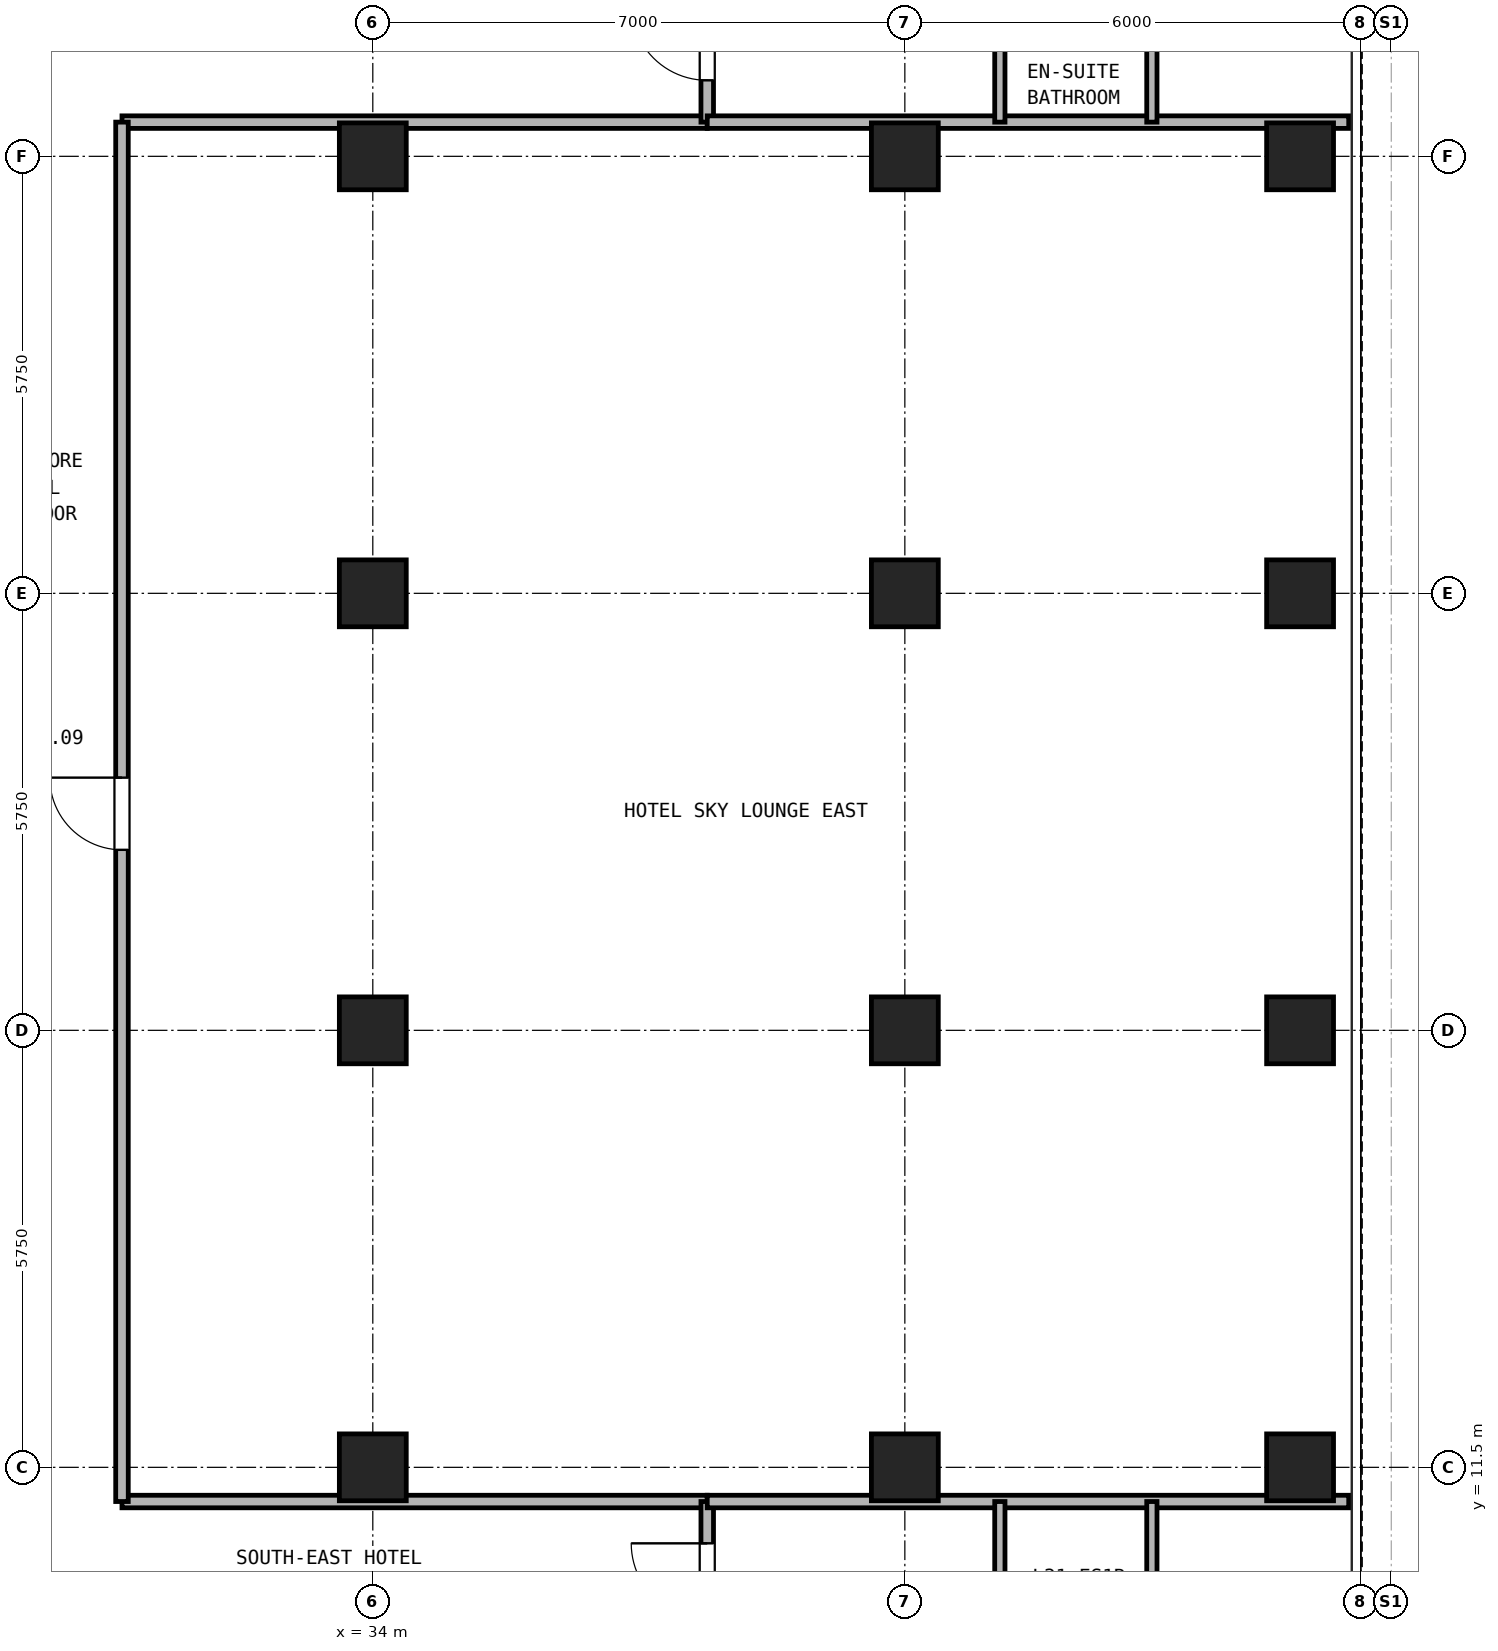
"""IFC4 building model, lengths in metres.
Left out: names, types, materials, properties, quantities, classifications, styles, units other than length and angle.
Written with IfcOpenShell. Run it as: python <this file> out.ifc"""

import sys

from ifc_helpers import new_model, si_unit, direction, frame, frame_2d, origin, origin_2d, place, context, subcontext, project, spatial, rectangle, hollow_rectangle, extrude, source, transform, mapped, element, fill, save


model = new_model("IFC4")
c1 = context("Model", 3, precision=1e-05, world=origin(), true_north=direction((0.0, 1.0)))
c2 = subcontext(c1, "Body", "Model", "MODEL_VIEW")
j1 = project(units=[si_unit("LENGTHUNIT", "METRE"), si_unit("PLANEANGLEUNIT", "RADIAN")], contexts=[c1])
p1 = place(None, origin())
s1 = spatial("IfcSite", under=j1, at=p1, CompositionType="ELEMENT")
p2 = place(p1, origin())
s2 = spatial("IfcBuilding", under=s1, at=p2, CompositionType="ELEMENT")
p3 = place(p2, frame((0.0, 0.0, 115.1)))
s3 = spatial("IfcBuildingStorey", under=s2, at=p3, CompositionType="ELEMENT", Elevation=115.1)
m1 = source(origin(), c2, "Body", "SweptSolid", [
    extrude(hollow_rectangle(XDim=0.88, YDim=0.88, WallThickness=0.05, at=origin_2d()), origin(), (0.0, 0.0, 1.0), 2.95),
])
for number, where, z_axis, x_axis in (
    (1, (46.2, 11.5, 0.0), (0.0, 0.0, 1.0), (1.0, 0.0, 0.0)),
    (2, (46.2, 17.25, 0.0), (0.0, 0.0, 1.0), (1.0, 0.0, 0.0)),
    (3, (46.2, 23.0, 0.0), (0.0, 0.0, 1.0), (1.0, 0.0, 0.0)),
    (4, (46.2, 28.75, 0.0), (0.0, 0.0, 1.0), (1.0, 0.0, 0.0)),
    (5, (34.0, 11.5, 0.0), (0.0, 0.0, 1.0), (1.0, 0.0, 0.0)),
    (6, (34.0, 17.25, 0.0), (0.0, 0.0, 1.0), (1.0, 0.0, 0.0)),
    (7, (34.0, 23.0, 0.0), (0.0, 0.0, 1.0), (1.0, 0.0, 0.0)),
    (8, (34.0, 28.75, 0.0), (0.0, 0.0, 1.0), (1.0, 0.0, 0.0)),
    (9, (41.0, 11.5, 0.0), (0.0, 0.0, 1.0), (1.0, 0.0, 0.0)),
    (10, (41.0, 17.25, 0.0), (0.0, 0.0, 1.0), (1.0, 0.0, 0.0)),
    (11, (41.0, 23.0, 0.0), (0.0, 0.0, 1.0), (1.0, 0.0, 0.0)),
    (12, (41.0, 28.75, 0.0), (0.0, 0.0, 1.0), (1.0, 0.0, 0.0)),
):
    element("IfcColumn", number, at=place(p3, frame(where, z_axis=z_axis, x_axis=x_axis)), inside=s3, PredefinedType="COLUMN", context=c2, shape_type="MappedRepresentation", body=[
        mapped(m1, transform((0.0, 0.0, 0.0), x_axis=(1.0, 0.0, 0.0), y_axis=(0.0, 1.0, 0.0), z_axis=(0.0, 0.0, 1.0), scale=1.0)),
    ])
for number, where, z_axis, x_axis in (
    (13, (30.7, 11.05, 0.0), (0.0, 0.0, 1.0), (1.0, 0.0, 0.0)),
    (14, (30.7, 29.2, 0.0), (0.0, 0.0, 1.0), (1.0, 0.0, 0.0)),
):
    element("IfcWall", number, at=place(p3, frame(where, z_axis=z_axis, x_axis=x_axis)), inside=s3, PredefinedType="PARTITIONING", context=c2, shape_type="SweptSolid", body=[
        extrude(rectangle(XDim=7.7, YDim=0.165, at=frame_2d((3.85, 0.0))), origin(), (0.0, 0.0, 1.0), 2.95),
    ])
p4 = place(p3, frame((30.7, 11.05, 0.0), z_axis=(0.0, 0.0, 1.0), x_axis=(0.0, 1.0, 0.0)))
e15 = element("IfcWall", 15, at=p4, inside=s3, PredefinedType="PARTITIONING", context=c2, shape_type="SweptSolid", body=[
    extrude(rectangle(XDim=18.15, YDim=0.165, at=frame_2d((9.075, 0.0))), origin(), (0.0, 0.0, 1.0), 2.95),
])
p5 = place(p4, frame((8.575, 0.0, 0.0)))
e16 = element("IfcOpeningElement", 16, at=p5, cuts=e15, PredefinedType="OPENING", context=c2, shape_type="SweptSolid", body=[
    extrude(rectangle(XDim=0.95, YDim=2.15, at=frame_2d((0.475, 1.075))), frame((0.0, 0.093, 0.0), z_axis=(0.0, -1.0, 0.0), x_axis=(1.0, 0.0, 0.0)), (0.0, 0.0, 1.0), 0.185),
])
p6 = place(p3, frame((38.4, 0.16, 0.0), z_axis=(0.0, 0.0, 1.0), x_axis=(0.0, 1.0, 0.0)))
e17 = element("IfcWall", 17, at=p6, inside=s3, PredefinedType="PARTITIONING", context=c2, shape_type="SweptSolid", body=[
    extrude(rectangle(XDim=10.89, YDim=0.165, at=frame_2d((5.445, 0.0))), origin(), (0.0, 0.0, 1.0), 2.95),
])
p7 = place(p6, frame((9.34, 0.0, 0.0)))
e18 = element("IfcOpeningElement", 18, at=p7, cuts=e17, PredefinedType="OPENING", context=c2, shape_type="SweptSolid", body=[
    extrude(rectangle(XDim=1.0, YDim=2.15, at=frame_2d((0.5, 1.075))), frame((0.0, 0.093, 0.0), z_axis=(0.0, -1.0, 0.0), x_axis=(1.0, 0.0, 0.0)), (0.0, 0.0, 1.0), 0.185),
])
p8 = place(p3, frame((38.4, 29.2, 0.0), z_axis=(0.0, 0.0, 1.0), x_axis=(0.0, 1.0, 0.0)))
e19 = element("IfcWall", 19, at=p8, inside=s3, PredefinedType="PARTITIONING", context=c2, shape_type="SweptSolid", body=[
    extrude(rectangle(XDim=5.94, YDim=0.165, at=frame_2d((2.97, 0.0))), origin(), (0.0, 0.0, 1.0), 2.95),
])
p9 = place(p8, frame((0.55, 0.0, 0.0)))
e20 = element("IfcOpeningElement", 20, at=p9, cuts=e19, PredefinedType="OPENING", context=c2, shape_type="SweptSolid", body=[
    extrude(rectangle(XDim=1.0, YDim=2.15, at=frame_2d((0.5, 1.075))), frame((0.0, 0.093, 0.0), z_axis=(0.0, -1.0, 0.0), x_axis=(1.0, 0.0, 0.0)), (0.0, 0.0, 1.0), 0.185),
])
for number, where, z_axis, x_axis in (
    (21, (38.4, 11.05, 0.0), (0.0, 0.0, 1.0), (1.0, 0.0, 0.0)),
    (22, (38.4, 29.2, 0.0), (0.0, 0.0, 1.0), (1.0, 0.0, 0.0)),
):
    element("IfcWall", number, at=place(p3, frame(where, z_axis=z_axis, x_axis=x_axis)), inside=s3, PredefinedType="PARTITIONING", context=c2, shape_type="SweptSolid", body=[
        extrude(rectangle(XDim=8.44, YDim=0.165, at=frame_2d((4.22, 0.0))), origin(), (0.0, 0.0, 1.0), 2.95),
    ])
for number, where, z_axis, x_axis in (
    (23, (42.25, 8.95, 0.0), (0.0, 0.0, 1.0), (0.0, 1.0, 0.0)),
    (24, (44.25, 8.95, 0.0), (0.0, 0.0, 1.0), (0.0, 1.0, 0.0)),
    (25, (42.25, 29.2, 0.0), (0.0, 0.0, 1.0), (0.0, 1.0, 0.0)),
    (26, (44.25, 29.2, 0.0), (0.0, 0.0, 1.0), (0.0, 1.0, 0.0)),
):
    element("IfcWall", number, at=place(p3, frame(where, z_axis=z_axis, x_axis=x_axis)), inside=s3, PredefinedType="PARTITIONING", context=c2, shape_type="SweptSolid", body=[
        extrude(rectangle(XDim=2.1, YDim=0.135, at=frame_2d((1.05, 0.0))), origin(), (0.0, 0.0, 1.0), 2.95),
    ])
p10 = place(p7, frame((1.0, 0.0, 0.0), z_axis=(0.0, 0.0, 1.0), x_axis=(-1.0, 0.0, 0.0)))
e27 = element("IfcDoor", 27, at=p10, inside=s3, OperationType="SINGLE_SWING_RIGHT", PredefinedType="DOOR", context=c2, shape_type="SweptSolid", body=[
    extrude(rectangle(XDim=1.0, YDim=2.15, at=frame_2d((0.5, 1.075))), frame((0.0, 0.025, 0.0), z_axis=(0.0, -1.0, 0.0), x_axis=(1.0, 0.0, 0.0)), (0.0, 0.0, 1.0), 0.05),
])
fill(e18, e27)
p11 = place(p9, frame((1.0, 0.0, 0.0), z_axis=(0.0, 0.0, 1.0), x_axis=(-1.0, 0.0, 0.0)))
e28 = element("IfcDoor", 28, at=p11, inside=s3, OperationType="SINGLE_SWING_RIGHT", PredefinedType="DOOR", context=c2, shape_type="SweptSolid", body=[
    extrude(rectangle(XDim=1.0, YDim=2.15, at=frame_2d((0.5, 1.075))), frame((0.0, 0.025, 0.0), z_axis=(0.0, -1.0, 0.0), x_axis=(1.0, 0.0, 0.0)), (0.0, 0.0, 1.0), 0.05),
])
fill(e20, e28)
p12 = place(p5, origin())
e29 = element("IfcDoor", 29, at=p12, inside=s3, OperationType="SINGLE_SWING_RIGHT", PredefinedType="DOOR", context=c2, shape_type="SweptSolid", body=[
    extrude(rectangle(XDim=0.95, YDim=2.15, at=frame_2d((0.475, 1.075))), frame((0.0, 0.025, 0.0), z_axis=(0.0, -1.0, 0.0), x_axis=(1.0, 0.0, 0.0)), (0.0, 0.0, 1.0), 0.05),
])
fill(e16, e29)
save(model, sys.argv[1])
